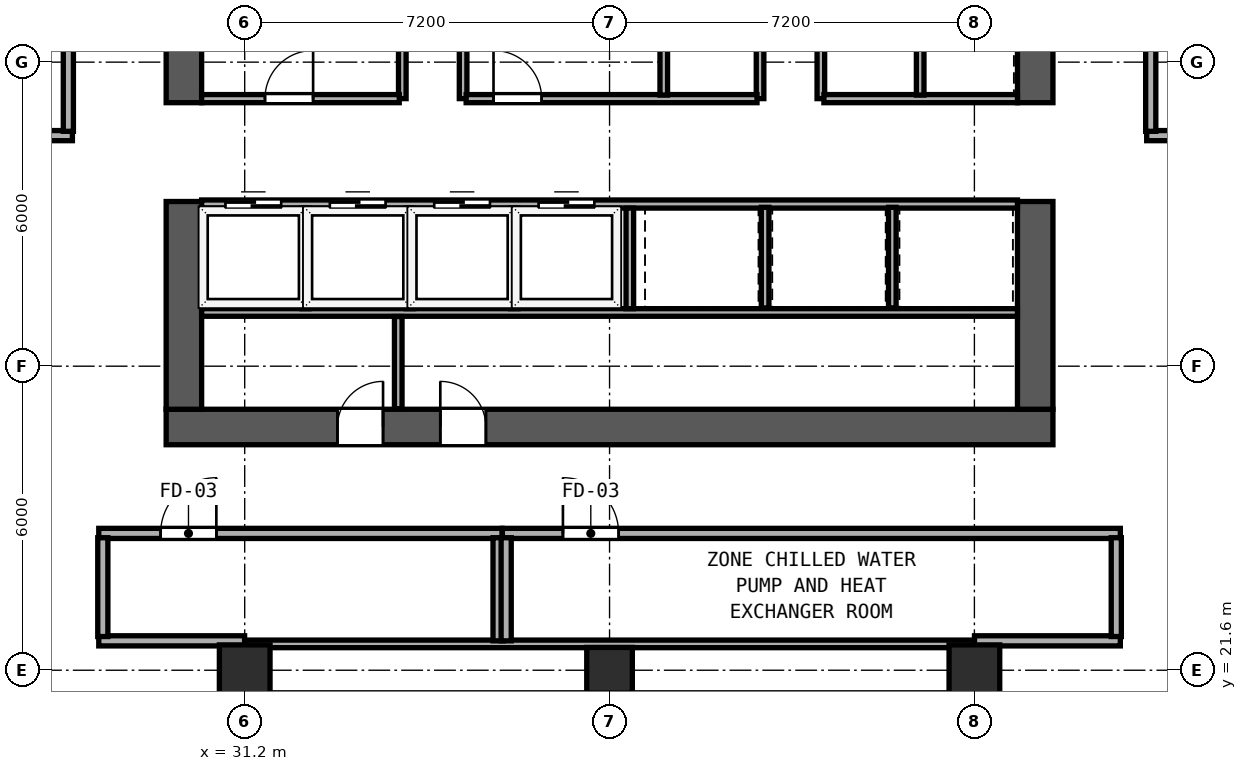
"""IFC4 building model, lengths in metres.
Left out: names, types, materials, properties, quantities, classifications, styles, units other than length and angle.
Written with IfcOpenShell. Run it as: python <this file> out.ifc"""

import sys

from ifc_helpers import new_model, si_unit, direction, frame, frame_2d, origin, origin_2d, place, context, subcontext, project, spatial, rectangle, hollow_rectangle, extrude, element, fill, save


model = new_model("IFC4")
c1 = context("Model", 3, precision=1e-05, world=origin(), true_north=direction((0.0, 1.0)))
c2 = subcontext(c1, "Body", "Model", "MODEL_VIEW")
j1 = project(units=[si_unit("LENGTHUNIT", "METRE"), si_unit("PLANEANGLEUNIT", "RADIAN")], contexts=[c1])
p1 = place(None, origin())
s1 = spatial("IfcSite", under=j1, at=p1, CompositionType="ELEMENT")
p2 = place(p1, origin())
s2 = spatial("IfcBuilding", under=s1, at=p2, CompositionType="ELEMENT")
p3 = place(p2, frame((0.0, 0.0, 160.0)))
s3 = spatial("IfcBuildingStorey", under=s2, at=p3, CompositionType="ELEMENT", Elevation=160.0)
p4 = place(p3, frame((29.65, 26.4, 0.0), z_axis=(0.0, 0.0, 1.0), x_axis=(1.0, 0.0, 0.0)))
e1 = element("IfcWall", 1, at=p4, inside=s3, PredefinedType="SHEAR", context=c2, shape_type="SweptSolid", body=[
    extrude(rectangle(XDim=17.5, YDim=0.7, at=frame_2d((8.75, 0.0))), origin(), (0.0, 0.0, 1.0), 4.35),
])
p5 = place(p4, frame((4.28, 0.0, 0.0), z_axis=(0.0, 0.0, 1.0), x_axis=(-1.0, 0.0, 0.0)))
e2 = element("IfcOpeningElement", 2, at=p5, cuts=e1, PredefinedType="OPENING", context=c2, shape_type="SweptSolid", body=[
    extrude(rectangle(XDim=0.9, YDim=2.1, at=frame_2d((0.45, 1.05))), frame((0.0, 0.36, 0.0), z_axis=(0.0, -1.0, 0.0), x_axis=(1.0, 0.0, 0.0)), (0.0, 0.0, 1.0), 0.72),
])
p6 = place(p4, frame((6.31, 0.0, 0.0), z_axis=(0.0, 0.0, 1.0), x_axis=(-1.0, 0.0, 0.0)))
e3 = element("IfcOpeningElement", 3, at=p6, cuts=e1, PredefinedType="OPENING", context=c2, shape_type="SweptSolid", body=[
    extrude(rectangle(XDim=0.9, YDim=2.1, at=frame_2d((0.45, 1.05))), frame((0.0, 0.36, 0.0), z_axis=(0.0, -1.0, 0.0), x_axis=(1.0, 0.0, 0.0)), (0.0, 0.0, 1.0), 0.72),
])
p7 = place(p3, frame((30.0, 26.75, 0.0), z_axis=(0.0, 0.0, 1.0), x_axis=(0.0, 1.0, 0.0)))
e4 = element("IfcWall", 4, at=p7, inside=s3, PredefinedType="SHEAR", context=c2, shape_type="SweptSolid", body=[
    extrude(rectangle(XDim=4.1, YDim=0.7, at=frame_2d((2.05, 0.0))), origin(), (0.0, 0.0, 1.0), 4.35),
])
p8 = place(p3, frame((30.0, 32.8, 0.0), z_axis=(0.0, 0.0, 1.0), x_axis=(0.0, 1.0, 0.0)))
e5 = element("IfcWall", 5, at=p8, inside=s3, PredefinedType="SHEAR", context=c2, shape_type="SweptSolid", body=[
    extrude(rectangle(XDim=10.05, YDim=0.7, at=frame_2d((5.025, 0.0))), origin(), (0.0, 0.0, 1.0), 4.35),
])
p9 = place(p3, frame((46.8, 26.75, 0.0), z_axis=(0.0, 0.0, 1.0), x_axis=(0.0, 1.0, 0.0)))
e6 = element("IfcWall", 6, at=p9, inside=s3, PredefinedType="SHEAR", context=c2, shape_type="SweptSolid", body=[
    extrude(rectangle(XDim=4.1, YDim=0.7, at=frame_2d((2.05, 0.0))), origin(), (0.0, 0.0, 1.0), 4.35),
])
p10 = place(p3, frame((46.8, 32.8, 0.0), z_axis=(0.0, 0.0, 1.0), x_axis=(0.0, 1.0, 0.0)))
e7 = element("IfcWall", 7, at=p10, inside=s3, PredefinedType="SHEAR", context=c2, shape_type="SweptSolid", body=[
    extrude(rectangle(XDim=10.05, YDim=0.7, at=frame_2d((5.025, 0.0))), origin(), (0.0, 0.0, 1.0), 4.35),
])
for number, where, z_axis, x_axis in (
    (8, (31.2, 21.6, 0.0), (0.0, 0.0, 1.0), (1.0, 0.0, 0.0)),
    (9, (45.6, 21.6, 0.0), (0.0, 0.0, 1.0), (1.0, 0.0, 0.0)),
):
    element("IfcColumn", number, at=place(p3, frame(where, z_axis=z_axis, x_axis=x_axis)), inside=s3, PredefinedType="COLUMN", context=c2, shape_type="SweptSolid", body=[
        extrude(hollow_rectangle(XDim=1.0, YDim=1.0, WallThickness=0.038, at=origin_2d()), origin(), (0.0, 0.0, 1.0), 4.6),
    ])
p11 = place(p3, frame((38.4, 21.6, 0.0), z_axis=(0.0, 0.0, 1.0), x_axis=(1.0, 0.0, 0.0)))
e10 = element("IfcColumn", 10, at=p11, inside=s3, PredefinedType="COLUMN", context=c2, shape_type="SweptSolid", body=[
    extrude(hollow_rectangle(XDim=0.9, YDim=0.9, WallThickness=0.034, at=origin_2d()), origin(), (0.0, 0.0, 1.0), 4.6),
])
p12 = place(p3, frame((24.492, 21.601, 0.0), z_axis=(0.0, 0.0, 1.0), x_axis=(0.970148945932, -0.242509840432, 0.0)))
e11 = element("IfcWall", 11, at=p12, inside=s3, PredefinedType="PARAPET", context=c2, shape_type="SweptSolid", body=[
    extrude(rectangle(XDim=4.456, YDim=0.16, at=frame_2d((2.228, 0.0))), origin(), (0.0, 0.0, 1.0), 1.15),
])
p13 = place(p3, frame((47.985, 20.52, 0.0), z_axis=(0.0, 0.0, 1.0), x_axis=(0.970152168055, 0.242496950122, 0.0)))
e12 = element("IfcWall", 12, at=p13, inside=s3, PredefinedType="PARAPET", context=c2, shape_type="SweptSolid", body=[
    extrude(rectangle(XDim=4.456, YDim=0.16, at=frame_2d((2.228, 0.0))), origin(), (0.0, 0.0, 1.0), 1.15),
])
for number, where, z_axis, x_axis in (
    (13, (34.31, 32.88, 0.0), (0.0, 0.0, 1.0), (0.0, 1.0, 0.0)),
    (14, (35.51, 32.88, 0.0), (0.0, 0.0, 1.0), (0.0, 1.0, 0.0)),
    (15, (41.37, 32.88, 0.0), (0.0, 0.0, 1.0), (0.0, 1.0, 0.0)),
    (16, (42.57, 32.88, 0.0), (0.0, 0.0, 1.0), (0.0, 1.0, 0.0)),
):
    element("IfcWall", number, at=place(p3, frame(where, z_axis=z_axis, x_axis=x_axis)), inside=s3, PredefinedType="SOLIDWALL", context=c2, shape_type="SweptSolid", body=[
        extrude(rectangle(XDim=2.17, YDim=0.15, at=frame_2d((1.085, 0.0))), origin(), (0.0, 0.0, 1.0), 4.35),
    ])
p14 = place(p3, frame((30.35, 32.88, 0.0), z_axis=(0.0, 0.0, 1.0), x_axis=(1.0, 0.0, 0.0)))
e17 = element("IfcWall", 17, at=p14, inside=s3, PredefinedType="SOLIDWALL", context=c2, shape_type="SweptSolid", body=[
    extrude(rectangle(XDim=3.9, YDim=0.16, at=frame_2d((1.95, 0.0))), origin(), (0.0, 0.0, 1.0), 4.35),
])
p15 = place(p14, frame((2.2, 0.0, 0.0), z_axis=(0.0, 0.0, 1.0), x_axis=(-1.0, 0.0, 0.0)))
e18 = element("IfcOpeningElement", 18, at=p15, cuts=e17, PredefinedType="OPENING", context=c2, shape_type="SweptSolid", body=[
    extrude(rectangle(XDim=0.95, YDim=2.12, at=frame_2d((0.475, 1.06))), frame((0.0, 0.09, 0.0), z_axis=(0.0, -1.0, 0.0), x_axis=(1.0, 0.0, 0.0)), (0.0, 0.0, 1.0), 0.18),
])
p16 = place(p3, frame((35.57, 32.88, 0.0), z_axis=(0.0, 0.0, 1.0), x_axis=(1.0, 0.0, 0.0)))
e19 = element("IfcWall", 19, at=p16, inside=s3, PredefinedType="SOLIDWALL", context=c2, shape_type="SweptSolid", body=[
    extrude(rectangle(XDim=5.74, YDim=0.16, at=frame_2d((2.87, 0.0))), origin(), (0.0, 0.0, 1.0), 4.35),
])
p17 = place(p16, frame((1.49, 0.0, 0.0), z_axis=(0.0, 0.0, 1.0), x_axis=(-1.0, 0.0, 0.0)))
e20 = element("IfcOpeningElement", 20, at=p17, cuts=e19, PredefinedType="OPENING", context=c2, shape_type="SweptSolid", body=[
    extrude(rectangle(XDim=0.95, YDim=2.12, at=frame_2d((0.475, 1.06))), frame((0.0, 0.09, 0.0), z_axis=(0.0, -1.0, 0.0), x_axis=(1.0, 0.0, 0.0)), (0.0, 0.0, 1.0), 0.18),
])
p18 = place(p3, frame((42.63, 32.88, 0.0), z_axis=(0.0, 0.0, 1.0), x_axis=(1.0, 0.0, 0.0)))
e21 = element("IfcWall", 21, at=p18, inside=s3, PredefinedType="SOLIDWALL", context=c2, shape_type="SweptSolid", body=[
    extrude(rectangle(XDim=3.82, YDim=0.16, at=frame_2d((1.91, 0.0))), origin(), (0.0, 0.0, 1.0), 4.35),
])
for number, where, z_axis, x_axis in (
    (22, (39.47, 32.95, 0.0), (0.0, 0.0, 1.0), (0.0, 1.0, 0.0)),
    (23, (44.53, 32.95, 0.0), (0.0, 0.0, 1.0), (0.0, 1.0, 0.0)),
):
    element("IfcWall", number, at=place(p3, frame(where, z_axis=z_axis, x_axis=x_axis)), inside=s3, PredefinedType="SOLIDWALL", context=c2, shape_type="SweptSolid", body=[
        extrude(rectangle(XDim=2.05, YDim=0.15, at=frame_2d((1.025, 0.0))), origin(), (0.0, 0.0, 1.0), 4.35),
    ])
p19 = place(p3, frame((30.35, 30.8, 0.0), z_axis=(0.0, 0.0, 1.0), x_axis=(1.0, 0.0, 0.0)))
e24 = element("IfcWall", 24, at=p19, inside=s3, PredefinedType="SOLIDWALL", context=c2, shape_type="SweptSolid", body=[
    extrude(rectangle(XDim=16.1, YDim=0.16, at=frame_2d((8.05, 0.0))), origin(), (0.0, 0.0, 1.0), 4.35),
])
p20 = place(p19, frame((0.47, 0.0, 0.0)))
e25 = element("IfcOpeningElement", 25, at=p20, cuts=e24, PredefinedType="OPENING", context=c2, shape_type="SweptSolid", body=[
    extrude(rectangle(XDim=1.1, YDim=2.2, at=frame_2d((0.55, 1.1))), frame((0.0, 0.09, 0.0), z_axis=(0.0, -1.0, 0.0), x_axis=(1.0, 0.0, 0.0)), (0.0, 0.0, 1.0), 0.18),
])
p21 = place(p19, frame((2.53, 0.0, 0.0)))
e26 = element("IfcOpeningElement", 26, at=p21, cuts=e24, PredefinedType="OPENING", context=c2, shape_type="SweptSolid", body=[
    extrude(rectangle(XDim=1.1, YDim=2.2, at=frame_2d((0.55, 1.1))), frame((0.0, 0.09, 0.0), z_axis=(0.0, -1.0, 0.0), x_axis=(1.0, 0.0, 0.0)), (0.0, 0.0, 1.0), 0.18),
])
p22 = place(p19, frame((4.59, 0.0, 0.0)))
e27 = element("IfcOpeningElement", 27, at=p22, cuts=e24, PredefinedType="OPENING", context=c2, shape_type="SweptSolid", body=[
    extrude(rectangle(XDim=1.1, YDim=2.2, at=frame_2d((0.55, 1.1))), frame((0.0, 0.09, 0.0), z_axis=(0.0, -1.0, 0.0), x_axis=(1.0, 0.0, 0.0)), (0.0, 0.0, 1.0), 0.18),
])
p23 = place(p19, frame((6.65, 0.0, 0.0)))
e28 = element("IfcOpeningElement", 28, at=p23, cuts=e24, PredefinedType="OPENING", context=c2, shape_type="SweptSolid", body=[
    extrude(rectangle(XDim=1.1, YDim=2.2, at=frame_2d((0.55, 1.1))), frame((0.0, 0.09, 0.0), z_axis=(0.0, -1.0, 0.0), x_axis=(1.0, 0.0, 0.0)), (0.0, 0.0, 1.0), 0.18),
])
p24 = place(p3, frame((30.35, 28.66, 0.0), z_axis=(0.0, 0.0, 1.0), x_axis=(1.0, 0.0, 0.0)))
e29 = element("IfcWall", 29, at=p24, inside=s3, PredefinedType="PARTITIONING", context=c2, shape_type="SweptSolid", body=[
    extrude(rectangle(XDim=16.1, YDim=0.15, at=frame_2d((8.05, 0.0))), origin(), (0.0, 0.0, 1.0), 4.35),
])
for number, where, z_axis, x_axis in (
    (30, (32.4, 28.735, 0.0), (0.0, 0.0, 1.0), (0.0, 1.0, 0.0)),
    (31, (34.46, 28.735, 0.0), (0.0, 0.0, 1.0), (0.0, 1.0, 0.0)),
    (32, (36.52, 28.735, 0.0), (0.0, 0.0, 1.0), (0.0, 1.0, 0.0)),
    (33, (38.8, 28.735, 0.0), (0.0, 0.0, 1.0), (0.0, 1.0, 0.0)),
):
    element("IfcWall", number, at=place(p3, frame(where, z_axis=z_axis, x_axis=x_axis)), inside=s3, PredefinedType="SOLIDWALL", context=c2, shape_type="SweptSolid", body=[
        extrude(rectangle(XDim=1.985, YDim=0.15, at=frame_2d((0.992, 0.0))), origin(), (0.0, 0.0, 1.0), 4.35),
    ])
p25 = place(p3, frame((34.23, 26.76, 0.0), z_axis=(0.0, 0.0, 1.0), x_axis=(0.0, 1.0, 0.0)))
e34 = element("IfcWall", 34, at=p25, inside=s3, PredefinedType="PARTITIONING", context=c2, shape_type="SweptSolid", body=[
    extrude(rectangle(XDim=1.82, YDim=0.15, at=frame_2d((0.91, 0.0))), origin(), (0.0, 0.0, 1.0), 4.35),
])
for number, where, z_axis, x_axis in (
    (35, (41.47, 28.75, 0.0), (0.0, 0.0, 1.0), (0.0, 1.0, 0.0)),
    (36, (43.98, 28.75, 0.0), (0.0, 0.0, 1.0), (0.0, 1.0, 0.0)),
):
    element("IfcWall", number, at=place(p3, frame(where, z_axis=z_axis, x_axis=x_axis)), inside=s3, PredefinedType="SOLIDWALL", context=c2, shape_type="SweptSolid", body=[
        extrude(rectangle(XDim=1.985, YDim=0.15, at=frame_2d((0.993, 0.0))), origin(), (0.0, 0.0, 1.0), 4.35),
    ])
p26 = place(p3, frame((31.2, 22.12, 0.0), z_axis=(0.0, 0.0, 1.0), x_axis=(1.0, 0.0, 0.0)))
e37 = element("IfcWall", 37, at=p26, inside=s3, PredefinedType="PARTITIONING", context=c2, shape_type="SweptSolid", body=[
    extrude(rectangle(XDim=14.4, YDim=0.15, at=frame_2d((7.2, 0.0))), origin(), (0.0, 0.0, 1.0), 4.35),
])
p27 = place(p3, frame((24.54, 32.15, 0.0), z_axis=(0.0, 0.0, 1.0), x_axis=(1.0, 0.0, 0.0)))
e38 = element("IfcWall", 38, at=p27, inside=s3, PredefinedType="SOLIDWALL", context=c2, shape_type="SweptSolid", body=[
    extrude(rectangle(XDim=3.26, YDim=0.2, at=frame_2d((1.63, 0.0))), origin(), (0.0, 0.0, 1.0), 4.35),
])
p28 = place(p3, frame((27.72, 32.235, 0.0), z_axis=(0.0, 0.0, 1.0), x_axis=(0.0, 1.0, 0.0)))
e39 = element("IfcWall", 39, at=p28, inside=s3, PredefinedType="SOLIDWALL", context=c2, shape_type="SweptSolid", body=[
    extrude(rectangle(XDim=6.28, YDim=0.2, at=frame_2d((3.14, 0.0))), origin(), (0.0, 0.0, 1.0), 4.35),
])
p29 = place(p28, frame((3.135, 0.0, 0.0), z_axis=(0.0, 0.0, 1.0), x_axis=(-1.0, 0.0, 0.0)))
e40 = element("IfcOpeningElement", 40, at=p29, cuts=e39, PredefinedType="OPENING", context=c2, shape_type="SweptSolid", body=[
    extrude(rectangle(XDim=1.1, YDim=2.15, at=frame_2d((0.55, 1.075))), frame((0.0, 0.11, 0.0), z_axis=(0.0, -1.0, 0.0), x_axis=(1.0, 0.0, 0.0)), (0.0, 0.0, 1.0), 0.22),
])
p30 = place(p3, frame((49.0, 32.15, 0.0), z_axis=(0.0, 0.0, 1.0), x_axis=(1.0, 0.0, 0.0)))
e41 = element("IfcWall", 41, at=p30, inside=s3, PredefinedType="SOLIDWALL", context=c2, shape_type="SweptSolid", body=[
    extrude(rectangle(XDim=3.26, YDim=0.2, at=frame_2d((1.63, 0.0))), origin(), (0.0, 0.0, 1.0), 4.35),
])
p31 = place(p3, frame((49.08, 32.235, 0.0), z_axis=(0.0, 0.0, 1.0), x_axis=(0.0, 1.0, 0.0)))
e42 = element("IfcWall", 42, at=p31, inside=s3, PredefinedType="SOLIDWALL", context=c2, shape_type="SweptSolid", body=[
    extrude(rectangle(XDim=6.28, YDim=0.2, at=frame_2d((3.14, 0.0))), origin(), (0.0, 0.0, 1.0), 4.35),
])
p32 = place(p31, frame((2.035, 0.0, 0.0)))
e43 = element("IfcOpeningElement", 43, at=p32, cuts=e42, PredefinedType="OPENING", context=c2, shape_type="SweptSolid", body=[
    extrude(rectangle(XDim=1.1, YDim=2.15, at=frame_2d((0.55, 1.075))), frame((0.0, 0.11, 0.0), z_axis=(0.0, -1.0, 0.0), x_axis=(1.0, 0.0, 0.0)), (0.0, 0.0, 1.0), 0.22),
])
p33 = place(p3, frame((28.32, 24.3, 0.0), z_axis=(0.0, 0.0, 1.0), x_axis=(1.0, 0.0, 0.0)))
e44 = element("IfcWall", 44, at=p33, inside=s3, PredefinedType="SOLIDWALL", context=c2, shape_type="SweptSolid", body=[
    extrude(rectangle(XDim=7.96, YDim=0.2, at=frame_2d((3.98, 0.0))), origin(), (0.0, 0.0, 1.0), 4.35),
])
p34 = place(p33, frame((2.321, 0.0, 0.0), z_axis=(0.0, 0.0, 1.0), x_axis=(-1.0, 0.0, 0.0)))
e45 = element("IfcOpeningElement", 45, at=p34, cuts=e44, PredefinedType="OPENING", context=c2, shape_type="SweptSolid", body=[
    extrude(rectangle(XDim=1.1, YDim=2.15, at=frame_2d((0.55, 1.075))), frame((0.0, 0.11, 0.0), z_axis=(0.0, -1.0, 0.0), x_axis=(1.0, 0.0, 0.0)), (0.0, 0.0, 1.0), 0.22),
])
p35 = place(p3, frame((28.32, 22.18, 0.0), z_axis=(0.0, 0.0, 1.0), x_axis=(1.0, 0.0, 0.0)))
e46 = element("IfcWall", 46, at=p35, inside=s3, PredefinedType="SOLIDWALL", context=c2, shape_type="SweptSolid", body=[
    extrude(rectangle(XDim=2.878, YDim=0.2, at=frame_2d((1.439, 0.0))), origin(), (0.0, 0.0, 1.0), 4.35),
])
p36 = place(p3, frame((28.4, 22.265, 0.0), z_axis=(0.0, 0.0, 1.0), x_axis=(0.0, 1.0, 0.0)))
e47 = element("IfcWall", 47, at=p36, inside=s3, PredefinedType="SOLIDWALL", context=c2, shape_type="SweptSolid", body=[
    extrude(rectangle(XDim=1.95, YDim=0.2, at=frame_2d((0.975, 0.0))), origin(), (0.0, 0.0, 1.0), 4.35),
])
p37 = place(p3, frame((36.2, 22.18, 0.0), z_axis=(0.0, 0.0, 1.0), x_axis=(0.0, 1.0, 0.0)))
e48 = element("IfcWall", 48, at=p37, inside=s3, PredefinedType="SOLIDWALL", context=c2, shape_type="SweptSolid", body=[
    extrude(rectangle(XDim=2.035, YDim=0.2, at=frame_2d((1.018, 0.0))), origin(), (0.0, 0.0, 1.0), 4.35),
])
p38 = place(p3, frame((36.285, 24.3, 0.0), z_axis=(0.0, 0.0, 1.0), x_axis=(1.0, 0.0, 0.0)))
e49 = element("IfcWall", 49, at=p38, inside=s3, PredefinedType="SOLIDWALL", context=c2, shape_type="SweptSolid", body=[
    extrude(rectangle(XDim=12.195, YDim=0.2, at=frame_2d((6.098, 0.0))), origin(), (0.0, 0.0, 1.0), 4.35),
])
p39 = place(p38, frame((2.295, 0.0, 0.0), z_axis=(0.0, 0.0, 1.0), x_axis=(-1.0, 0.0, 0.0)))
e50 = element("IfcOpeningElement", 50, at=p39, cuts=e49, PredefinedType="OPENING", context=c2, shape_type="SweptSolid", body=[
    extrude(rectangle(XDim=1.1, YDim=2.15, at=frame_2d((0.55, 1.075))), frame((0.0, 0.11, 0.0), z_axis=(0.0, -1.0, 0.0), x_axis=(1.0, 0.0, 0.0)), (0.0, 0.0, 1.0), 0.22),
])
p40 = place(p3, frame((45.602, 22.18, 0.0), z_axis=(0.0, 0.0, 1.0), x_axis=(1.0, 0.0, 0.0)))
e51 = element("IfcWall", 51, at=p40, inside=s3, PredefinedType="SOLIDWALL", context=c2, shape_type="SweptSolid", body=[
    extrude(rectangle(XDim=2.878, YDim=0.2, at=frame_2d((1.439, 0.0))), origin(), (0.0, 0.0, 1.0), 4.35),
])
p41 = place(p3, frame((36.36, 22.18, 0.0), z_axis=(0.0, 0.0, 1.0), x_axis=(0.0, 1.0, 0.0)))
e52 = element("IfcWall", 52, at=p41, inside=s3, PredefinedType="SOLIDWALL", context=c2, shape_type="SweptSolid", body=[
    extrude(rectangle(XDim=2.035, YDim=0.2, at=frame_2d((1.018, 0.0))), origin(), (0.0, 0.0, 1.0), 4.35),
])
p42 = place(p3, frame((48.4, 22.265, 0.0), z_axis=(0.0, 0.0, 1.0), x_axis=(0.0, 1.0, 0.0)))
e53 = element("IfcWall", 53, at=p42, inside=s3, PredefinedType="SOLIDWALL", context=c2, shape_type="SweptSolid", body=[
    extrude(rectangle(XDim=1.95, YDim=0.2, at=frame_2d((0.975, 0.0))), origin(), (0.0, 0.0, 1.0), 4.35),
])
p43 = place(p15, origin())
e54 = element("IfcDoor", 54, at=p43, inside=s3, OperationType="SINGLE_SWING_LEFT", PredefinedType="DOOR", context=c2, shape_type="SweptSolid", body=[
    extrude(rectangle(XDim=0.95, YDim=2.12, at=frame_2d((0.475, 1.06))), frame((0.0, 0.025, 0.0), z_axis=(0.0, -1.0, 0.0), x_axis=(1.0, 0.0, 0.0)), (0.0, 0.0, 1.0), 0.05),
])
fill(e18, e54)
p44 = place(p17, origin())
e55 = element("IfcDoor", 55, at=p44, inside=s3, OperationType="SINGLE_SWING_RIGHT", PredefinedType="DOOR", context=c2, shape_type="SweptSolid", body=[
    extrude(rectangle(XDim=0.95, YDim=2.12, at=frame_2d((0.475, 1.06))), frame((0.0, 0.025, 0.0), z_axis=(0.0, -1.0, 0.0), x_axis=(1.0, 0.0, 0.0)), (0.0, 0.0, 1.0), 0.05),
])
fill(e20, e55)
p45 = place(p20, origin())
e56 = element("IfcDoor", 56, at=p45, inside=s3, OperationType="SLIDING_TO_LEFT", PredefinedType="DOOR", context=c2, shape_type="SweptSolid", body=[
    extrude(rectangle(XDim=1.1, YDim=2.2, at=frame_2d((0.55, 1.1))), frame((0.0, 0.025, 0.0), z_axis=(0.0, -1.0, 0.0), x_axis=(1.0, 0.0, 0.0)), (0.0, 0.0, 1.0), 0.05),
])
fill(e25, e56)
p46 = place(p21, origin())
e57 = element("IfcDoor", 57, at=p46, inside=s3, OperationType="SLIDING_TO_LEFT", PredefinedType="DOOR", context=c2, shape_type="SweptSolid", body=[
    extrude(rectangle(XDim=1.1, YDim=2.2, at=frame_2d((0.55, 1.1))), frame((0.0, 0.025, 0.0), z_axis=(0.0, -1.0, 0.0), x_axis=(1.0, 0.0, 0.0)), (0.0, 0.0, 1.0), 0.05),
])
fill(e26, e57)
p47 = place(p22, origin())
e58 = element("IfcDoor", 58, at=p47, inside=s3, OperationType="SLIDING_TO_LEFT", PredefinedType="DOOR", context=c2, shape_type="SweptSolid", body=[
    extrude(rectangle(XDim=1.1, YDim=2.2, at=frame_2d((0.55, 1.1))), frame((0.0, 0.025, 0.0), z_axis=(0.0, -1.0, 0.0), x_axis=(1.0, 0.0, 0.0)), (0.0, 0.0, 1.0), 0.05),
])
fill(e27, e58)
p48 = place(p23, origin())
e59 = element("IfcDoor", 59, at=p48, inside=s3, OperationType="SLIDING_TO_LEFT", PredefinedType="DOOR", context=c2, shape_type="SweptSolid", body=[
    extrude(rectangle(XDim=1.1, YDim=2.2, at=frame_2d((0.55, 1.1))), frame((0.0, 0.025, 0.0), z_axis=(0.0, -1.0, 0.0), x_axis=(1.0, 0.0, 0.0)), (0.0, 0.0, 1.0), 0.05),
])
fill(e28, e59)
p49 = place(p5, origin())
e60 = element("IfcDoor", 60, at=p49, inside=s3, OperationType="SINGLE_SWING_LEFT", PredefinedType="DOOR", context=c2, shape_type="SweptSolid", body=[
    extrude(rectangle(XDim=0.9, YDim=2.1, at=frame_2d((0.45, 1.05))), frame((0.0, -0.195, 0.0), z_axis=(0.0, -1.0, 0.0), x_axis=(1.0, 0.0, 0.0)), (0.0, 0.0, 1.0), 0.05),
])
fill(e2, e60)
p50 = place(p6, origin())
e61 = element("IfcDoor", 61, at=p50, inside=s3, OperationType="SINGLE_SWING_RIGHT", PredefinedType="DOOR", context=c2, shape_type="SweptSolid", body=[
    extrude(rectangle(XDim=0.9, YDim=2.1, at=frame_2d((0.45, 1.05))), frame((0.0, -0.195, 0.0), z_axis=(0.0, -1.0, 0.0), x_axis=(1.0, 0.0, 0.0)), (0.0, 0.0, 1.0), 0.05),
])
fill(e3, e61)
p51 = place(p34, origin())
e62 = element("IfcDoor", 62, at=p51, inside=s3, OperationType="SINGLE_SWING_LEFT", PredefinedType="DOOR", context=c2, shape_type="SweptSolid", body=[
    extrude(rectangle(XDim=1.1, YDim=2.15, at=frame_2d((0.55, 1.075))), frame((0.0, 0.025, 0.0), z_axis=(0.0, -1.0, 0.0), x_axis=(1.0, 0.0, 0.0)), (0.0, 0.0, 1.0), 0.05),
])
fill(e45, e62)
p52 = place(p39, origin())
e63 = element("IfcDoor", 63, at=p52, inside=s3, OperationType="SINGLE_SWING_RIGHT", PredefinedType="DOOR", context=c2, shape_type="SweptSolid", body=[
    extrude(rectangle(XDim=1.1, YDim=2.15, at=frame_2d((0.55, 1.075))), frame((0.0, 0.025, 0.0), z_axis=(0.0, -1.0, 0.0), x_axis=(1.0, 0.0, 0.0)), (0.0, 0.0, 1.0), 0.05),
])
fill(e50, e63)
save(model, sys.argv[1])
